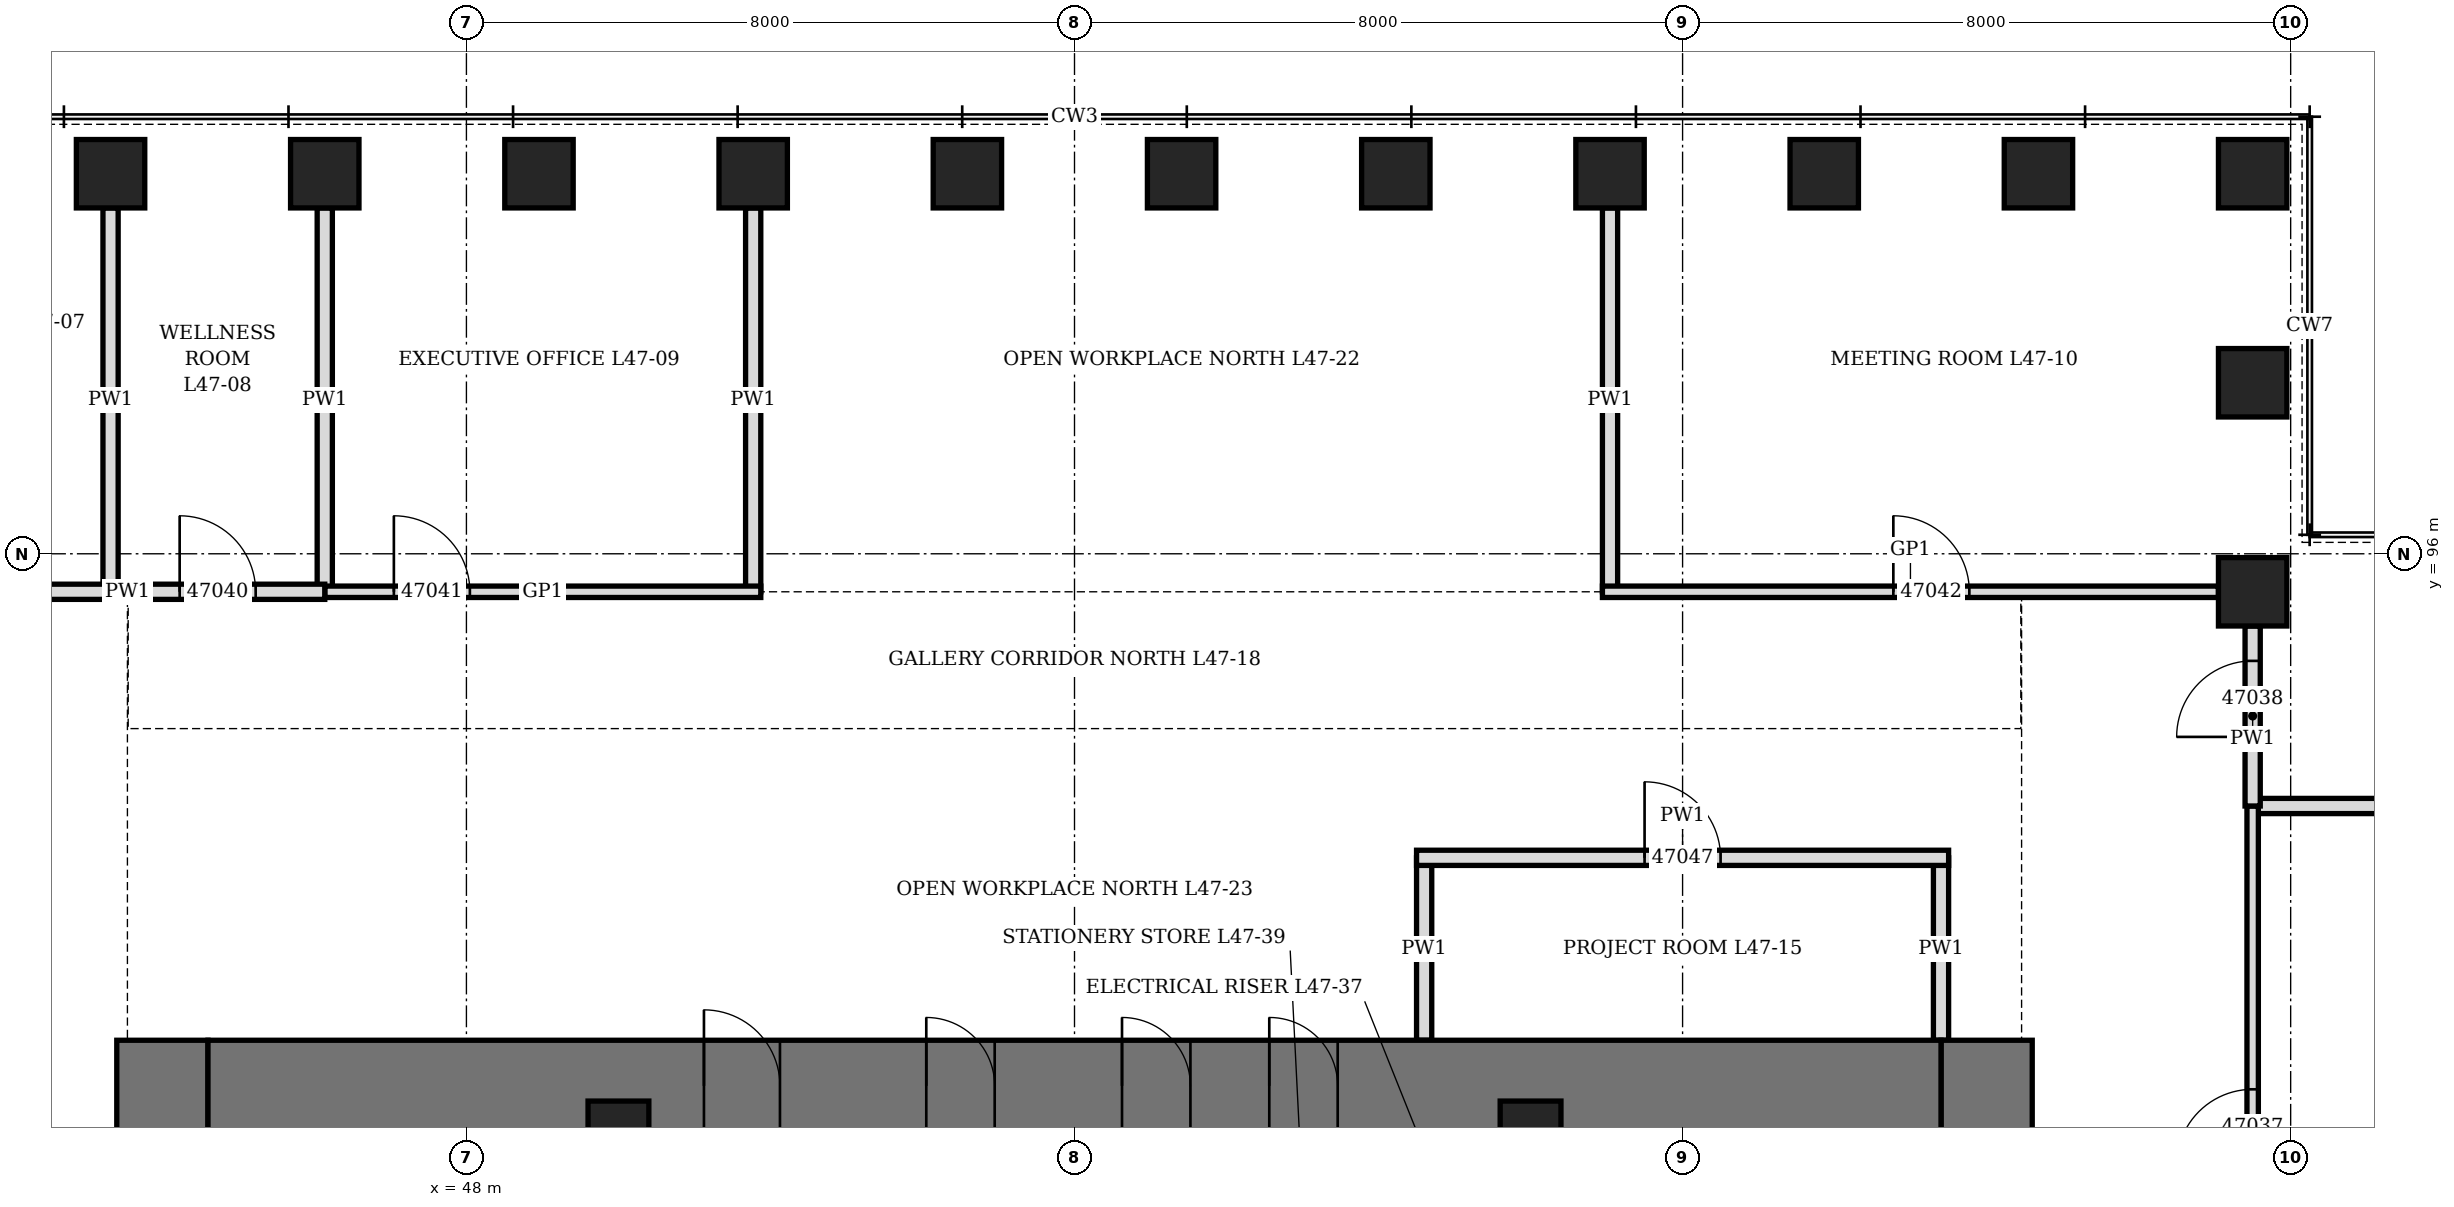
"""IFC4 building model, lengths in metres.
Left out: names, types, materials, properties, quantities, classifications, styles, units other than length and angle.
Written with IfcOpenShell. Run it as: python <this file> out.ifc"""

import sys

from ifc_helpers import new_model, si_unit, direction, frame, frame_2d, origin, origin_2d, place, context, subcontext, project, spatial, rectangle, hollow_rectangle, extrude, element, fill, save


model = new_model("IFC4")
c1 = context("Model", 3, precision=1e-05, world=origin(), true_north=direction((0.0, 1.0)))
c2 = subcontext(c1, "Body", "Model", "MODEL_VIEW")
j1 = project(units=[si_unit("LENGTHUNIT", "METRE"), si_unit("PLANEANGLEUNIT", "RADIAN")], contexts=[c1])
p1 = place(None, origin())
s1 = spatial("IfcSite", under=j1, at=p1, CompositionType="ELEMENT")
p2 = place(p1, origin())
s2 = spatial("IfcBuilding", under=s1, at=p2, CompositionType="ELEMENT")
p3 = place(p2, frame((0.0, 0.0, 210.7)))
s3 = spatial("IfcBuildingStorey", under=s2, at=p3, CompositionType="ELEMENT", Elevation=210.7)
for number, where, z_axis, x_axis in (
    (1, (71.5, 95.5, 0.0), (0.0, 0.0, 1.0), (0.0, 1.0, 0.0)),
    (2, (71.5, 98.25, 0.0), (0.0, 0.0, 1.0), (0.0, 1.0, 0.0)),
    (3, (71.5, 101.0, 0.0), (0.0, 0.0, 1.0), (1.0, 0.0, 0.0)),
    (4, (68.682, 101.0, 0.0), (0.0, 0.0, 1.0), (1.0, 0.0, 0.0)),
    (5, (65.864, 101.0, 0.0), (0.0, 0.0, 1.0), (1.0, 0.0, 0.0)),
    (6, (63.045, 101.0, 0.0), (0.0, 0.0, 1.0), (1.0, 0.0, 0.0)),
    (7, (60.227, 101.0, 0.0), (0.0, 0.0, 1.0), (1.0, 0.0, 0.0)),
    (8, (57.409, 101.0, 0.0), (0.0, 0.0, 1.0), (1.0, 0.0, 0.0)),
    (9, (54.591, 101.0, 0.0), (0.0, 0.0, 1.0), (1.0, 0.0, 0.0)),
    (10, (51.773, 101.0, 0.0), (0.0, 0.0, 1.0), (1.0, 0.0, 0.0)),
    (11, (48.955, 101.0, 0.0), (0.0, 0.0, 1.0), (1.0, 0.0, 0.0)),
    (12, (46.136, 101.0, 0.0), (0.0, 0.0, 1.0), (1.0, 0.0, 0.0)),
    (13, (43.318, 101.0, 0.0), (0.0, 0.0, 1.0), (1.0, 0.0, 0.0)),
):
    element("IfcColumn", number, at=place(p3, frame(where, z_axis=z_axis, x_axis=x_axis)), inside=s3, PredefinedType="COLUMN", context=c2, shape_type="SweptSolid", body=[
        extrude(hollow_rectangle(XDim=0.9, YDim=0.9, WallThickness=0.12, at=origin_2d()), origin(), (0.0, 0.0, 1.0), 4.2),
    ])
p4 = place(p3, frame((44.0, 70.4, 0.0), z_axis=(0.0, 0.0, 1.0), x_axis=(0.0, 1.0, 0.0)))
e14 = element("IfcWall", 14, at=p4, inside=s3, PredefinedType="SHEAR", context=c2, shape_type="SweptSolid", body=[
    extrude(rectangle(XDim=19.2, YDim=1.2, at=frame_2d((9.6, 0.0))), origin(), (0.0, 0.0, 1.0), 4.2),
])
p5 = place(p4, frame((8.6, 0.0, 0.0)))
e15 = element("IfcOpeningElement", 15, at=p5, cuts=e14, PredefinedType="OPENING", context=c2, shape_type="SweptSolid", body=[
    extrude(rectangle(XDim=2.0, YDim=2.4, at=frame_2d((1.0, 1.2))), frame((0.0, 0.61, 0.0), z_axis=(0.0, -1.0, 0.0), x_axis=(1.0, 0.0, 0.0)), (0.0, 0.0, 1.0), 1.22),
])
p6 = place(p3, frame((68.0, 70.4, 0.0), z_axis=(0.0, 0.0, 1.0), x_axis=(0.0, 1.0, 0.0)))
e16 = element("IfcWall", 16, at=p6, inside=s3, PredefinedType="SHEAR", context=c2, shape_type="SweptSolid", body=[
    extrude(rectangle(XDim=19.2, YDim=1.2, at=frame_2d((9.6, 0.0))), origin(), (0.0, 0.0, 1.0), 4.2),
])
p7 = place(p6, frame((8.6, 0.0, 0.0)))
e17 = element("IfcOpeningElement", 17, at=p7, cuts=e16, PredefinedType="OPENING", context=c2, shape_type="SweptSolid", body=[
    extrude(rectangle(XDim=2.0, YDim=2.4, at=frame_2d((1.0, 1.2))), frame((0.0, 0.61, 0.0), z_axis=(0.0, -1.0, 0.0), x_axis=(1.0, 0.0, 0.0)), (0.0, 0.0, 1.0), 1.22),
])
p8 = place(p3, frame((44.6, 89.0, 0.0), z_axis=(0.0, 0.0, 1.0), x_axis=(1.0, 0.0, 0.0)))
e18 = element("IfcWall", 18, at=p8, inside=s3, PredefinedType="SHEAR", context=c2, shape_type="SweptSolid", body=[
    extrude(rectangle(XDim=22.8, YDim=1.2, at=frame_2d((11.4, 0.0))), origin(), (0.0, 0.0, 1.0), 4.2),
])
p9 = place(p8, frame((6.525, 0.0, 0.0)))
e19 = element("IfcOpeningElement", 19, at=p9, cuts=e18, PredefinedType="OPENING", context=c2, shape_type="SweptSolid", body=[
    extrude(rectangle(XDim=1.0, YDim=2.1, at=frame_2d((0.5, 1.05))), frame((0.0, 0.61, 0.0), z_axis=(0.0, -1.0, 0.0), x_axis=(1.0, 0.0, 0.0)), (0.0, 0.0, 1.0), 1.22),
])
p10 = place(p8, frame((9.45, 0.0, 0.0)))
e20 = element("IfcOpeningElement", 20, at=p10, cuts=e18, PredefinedType="OPENING", context=c2, shape_type="SweptSolid", body=[
    extrude(rectangle(XDim=0.9, YDim=2.1, at=frame_2d((0.45, 1.05))), frame((0.0, 0.61, 0.0), z_axis=(0.0, -1.0, 0.0), x_axis=(1.0, 0.0, 0.0)), (0.0, 0.0, 1.0), 1.22),
])
p11 = place(p8, frame((12.025, 0.0, 0.0)))
e21 = element("IfcOpeningElement", 21, at=p11, cuts=e18, PredefinedType="OPENING", context=c2, shape_type="SweptSolid", body=[
    extrude(rectangle(XDim=0.9, YDim=2.1, at=frame_2d((0.45, 1.05))), frame((0.0, 0.61, 0.0), z_axis=(0.0, -1.0, 0.0), x_axis=(1.0, 0.0, 0.0)), (0.0, 0.0, 1.0), 1.22),
])
p12 = place(p8, frame((13.962, 0.0, 0.0)))
e22 = element("IfcOpeningElement", 22, at=p12, cuts=e18, PredefinedType="OPENING", context=c2, shape_type="SweptSolid", body=[
    extrude(rectangle(XDim=0.9, YDim=2.1, at=frame_2d((0.45, 1.05))), frame((0.0, 0.61, 0.0), z_axis=(0.0, -1.0, 0.0), x_axis=(1.0, 0.0, 0.0)), (0.0, 0.0, 1.0), 1.22),
])
for number, where, z_axis, x_axis in (
    (23, (50.0, 88.4, 0.0), (0.0, 0.0, 1.0), (1.0, 0.0, 0.0)),
    (24, (62.0, 88.4, 0.0), (0.0, 0.0, 1.0), (1.0, 0.0, 0.0)),
):
    element("IfcColumn", number, at=place(p3, frame(where, z_axis=z_axis, x_axis=x_axis)), inside=s3, PredefinedType="COLUMN", context=c2, shape_type="SweptSolid", body=[
        extrude(hollow_rectangle(XDim=0.8, YDim=0.8, WallThickness=0.1, at=origin_2d()), origin(), (0.0, 0.0, 1.0), 4.2),
    ])
for number, where, z_axis, x_axis in (
    (25, (71.5, 92.682, 0.0), (0.0, 0.0, 1.0), (1.0, 0.0, 0.0)),
    (26, (43.318, 95.5, 0.0), (0.0, 0.0, 1.0), (0.0, 1.0, 0.0)),
    (27, (46.136, 95.5, 0.0), (0.0, 0.0, 1.0), (0.0, 1.0, 0.0)),
    (28, (51.773, 95.5, 0.0), (0.0, 0.0, 1.0), (0.0, 1.0, 0.0)),
    (29, (63.045, 95.5, 0.0), (0.0, 0.0, 1.0), (0.0, 1.0, 0.0)),
):
    element("IfcWall", number, at=place(p3, frame(where, z_axis=z_axis, x_axis=x_axis)), inside=s3, PredefinedType="PARTITIONING", context=c2, shape_type="SweptSolid", body=[
        extrude(rectangle(XDim=5.05, YDim=0.2, at=frame_2d((2.525, 0.0))), origin(), (0.0, 0.0, 1.0), 3.428),
    ])
for number, where, z_axis, x_axis in (
    (30, (60.6, 89.6, 0.0), (0.0, 0.0, 1.0), (0.0, 1.0, 0.0)),
    (31, (67.4, 89.6, 0.0), (0.0, 0.0, 1.0), (0.0, 1.0, 0.0)),
):
    element("IfcWall", number, at=place(p3, frame(where, z_axis=z_axis, x_axis=x_axis)), inside=s3, PredefinedType="PARTITIONING", context=c2, shape_type="SweptSolid", body=[
        extrude(rectangle(XDim=2.4, YDim=0.2, at=frame_2d((1.2, 0.0))), origin(), (0.0, 0.0, 1.0), 4.04),
    ])
p13 = place(p3, frame((60.5, 92.0, 0.0), z_axis=(0.0, 0.0, 1.0), x_axis=(1.0, 0.0, 0.0)))
e32 = element("IfcWall", 32, at=p13, inside=s3, PredefinedType="PARTITIONING", context=c2, shape_type="SweptSolid", body=[
    extrude(rectangle(XDim=7.0, YDim=0.2, at=frame_2d((3.5, 0.0))), origin(), (0.0, 0.0, 1.0), 4.04),
])
p14 = place(p13, frame((3.0, 0.0, 0.0)))
e33 = element("IfcOpeningElement", 33, at=p14, cuts=e32, PredefinedType="OPENING", context=c2, shape_type="SweptSolid", body=[
    extrude(rectangle(XDim=1.0, YDim=2.1, at=frame_2d((0.5, 1.05))), frame((0.0, 0.11, 0.0), z_axis=(0.0, -1.0, 0.0), x_axis=(1.0, 0.0, 0.0)), (0.0, 0.0, 1.0), 0.22),
])
p15 = place(p3, frame((46.136, 95.5, 0.0), z_axis=(0.0, 0.0, 1.0), x_axis=(1.0, 0.0, 0.0)))
e34 = element("IfcWall", 34, at=p15, inside=s3, PredefinedType="PARTITIONING", context=c2, shape_type="SweptSolid", body=[
    extrude(rectangle(XDim=5.736, YDim=0.15, at=frame_2d((2.868, 0.0))), origin(), (0.0, 0.0, 1.0), 4.04),
])
p16 = place(p15, frame((0.909, 0.0, 0.0)))
e35 = element("IfcOpeningElement", 35, at=p16, cuts=e34, PredefinedType="OPENING", context=c2, shape_type="SweptSolid", body=[
    extrude(rectangle(XDim=1.0, YDim=2.1, at=frame_2d((0.5, 1.05))), frame((0.0, 0.085, 0.0), z_axis=(0.0, -1.0, 0.0), x_axis=(1.0, 0.0, 0.0)), (0.0, 0.0, 1.0), 0.17),
])
p17 = place(p3, frame((62.946, 95.5, 0.0), z_axis=(0.0, 0.0, 1.0), x_axis=(1.0, 0.0, 0.0)))
e36 = element("IfcWall", 36, at=p17, inside=s3, PredefinedType="PARTITIONING", context=c2, shape_type="SweptSolid", body=[
    extrude(rectangle(XDim=8.104, YDim=0.15, at=frame_2d((4.052, 0.0))), origin(), (0.0, 0.0, 1.0), 4.04),
])
p18 = place(p17, frame((3.827, 0.0, 0.0)))
e37 = element("IfcOpeningElement", 37, at=p18, cuts=e36, PredefinedType="OPENING", context=c2, shape_type="SweptSolid", body=[
    extrude(rectangle(XDim=1.0, YDim=2.4, at=frame_2d((0.5, 1.2))), frame((0.0, 0.085, 0.0), z_axis=(0.0, -1.0, 0.0), x_axis=(1.0, 0.0, 0.0)), (0.0, 0.0, 1.0), 0.17),
])
p19 = place(p3, frame((40.95, 95.5, 0.0), z_axis=(0.0, 0.0, 1.0), x_axis=(1.0, 0.0, 0.0)))
e38 = element("IfcWall", 38, at=p19, inside=s3, PredefinedType="PARTITIONING", context=c2, shape_type="SweptSolid", body=[
    extrude(rectangle(XDim=5.187, YDim=0.2, at=frame_2d((2.593, 0.0))), origin(), (0.0, 0.0, 1.0), 4.04),
])
p20 = place(p19, frame((0.459, 0.0, 0.0)))
e39 = element("IfcOpeningElement", 39, at=p20, cuts=e38, PredefinedType="OPENING", context=c2, shape_type="SweptSolid", body=[
    extrude(rectangle(XDim=1.0, YDim=2.1, at=frame_2d((0.5, 1.05))), frame((0.0, 0.11, 0.0), z_axis=(0.0, -1.0, 0.0), x_axis=(1.0, 0.0, 0.0)), (0.0, 0.0, 1.0), 0.22),
])
p21 = place(p19, frame((3.277, 0.0, 0.0)))
e40 = element("IfcOpeningElement", 40, at=p21, cuts=e38, PredefinedType="OPENING", context=c2, shape_type="SweptSolid", body=[
    extrude(rectangle(XDim=1.0, YDim=2.1, at=frame_2d((0.5, 1.05))), frame((0.0, 0.11, 0.0), z_axis=(0.0, -1.0, 0.0), x_axis=(1.0, 0.0, 0.0)), (0.0, 0.0, 1.0), 0.22),
])
p22 = place(p3, frame((71.5, 81.309, 0.0), z_axis=(0.0, 0.0, 1.0), x_axis=(0.0, 1.0, 0.0)))
e41 = element("IfcWall", 41, at=p22, inside=s3, PredefinedType="PARTITIONING", context=c2, shape_type="SweptSolid", body=[
    extrude(rectangle(XDim=11.373, YDim=0.15, at=frame_2d((5.687, 0.0))), origin(), (0.0, 0.0, 1.0), 4.04),
])
p23 = place(p22, frame((1.009, 0.0, 0.0)))
e42 = element("IfcOpeningElement", 42, at=p23, cuts=e41, PredefinedType="OPENING", context=c2, shape_type="SweptSolid", body=[
    extrude(rectangle(XDim=1.0, YDim=2.1, at=frame_2d((0.5, 1.05))), frame((0.0, 0.085, 0.0), z_axis=(0.0, -1.0, 0.0), x_axis=(1.0, 0.0, 0.0)), (0.0, 0.0, 1.0), 0.17),
])
p24 = place(p22, frame((6.646, 0.0, 0.0)))
e43 = element("IfcOpeningElement", 43, at=p24, cuts=e41, PredefinedType="OPENING", context=c2, shape_type="SweptSolid", body=[
    extrude(rectangle(XDim=1.0, YDim=2.1, at=frame_2d((0.5, 1.05))), frame((0.0, 0.085, 0.0), z_axis=(0.0, -1.0, 0.0), x_axis=(1.0, 0.0, 0.0)), (0.0, 0.0, 1.0), 0.17),
])
p25 = place(p3, frame((71.5, 92.682, 0.0), z_axis=(0.0, 0.0, 1.0), x_axis=(0.0, 1.0, 0.0)))
e44 = element("IfcWall", 44, at=p25, inside=s3, PredefinedType="PARTITIONING", context=c2, shape_type="SweptSolid", body=[
    extrude(rectangle(XDim=2.368, YDim=0.2, at=frame_2d((1.184, 0.0))), origin(), (0.0, 0.0, 1.0), 4.04),
])
p26 = place(p25, frame((0.909, 0.0, 0.0)))
e45 = element("IfcOpeningElement", 45, at=p26, cuts=e44, PredefinedType="OPENING", context=c2, shape_type="SweptSolid", body=[
    extrude(rectangle(XDim=1.0, YDim=2.1, at=frame_2d((0.5, 1.05))), frame((0.0, 0.11, 0.0), z_axis=(0.0, -1.0, 0.0), x_axis=(1.0, 0.0, 0.0)), (0.0, 0.0, 1.0), 0.22),
])
p27 = place(p9, origin())
e46 = element("IfcDoor", 46, at=p27, inside=s3, OperationType="SINGLE_SWING_LEFT", PredefinedType="DOOR", context=c2, shape_type="SweptSolid", body=[
    extrude(rectangle(XDim=1.0, YDim=2.1, at=frame_2d((0.5, 1.05))), frame((0.0, 0.35, 0.0), z_axis=(0.0, -1.0, 0.0), x_axis=(1.0, 0.0, 0.0)), (0.0, 0.0, 1.0), 0.7),
])
fill(e19, e46)
p28 = place(p10, origin())
e47 = element("IfcDoor", 47, at=p28, inside=s3, OperationType="SINGLE_SWING_LEFT", PredefinedType="DOOR", context=c2, shape_type="SweptSolid", body=[
    extrude(rectangle(XDim=0.9, YDim=2.1, at=frame_2d((0.45, 1.05))), frame((0.0, 0.35, 0.0), z_axis=(0.0, -1.0, 0.0), x_axis=(1.0, 0.0, 0.0)), (0.0, 0.0, 1.0), 0.7),
])
fill(e20, e47)
p29 = place(p11, origin())
e48 = element("IfcDoor", 48, at=p29, inside=s3, OperationType="SINGLE_SWING_LEFT", PredefinedType="DOOR", context=c2, shape_type="SweptSolid", body=[
    extrude(rectangle(XDim=0.9, YDim=2.1, at=frame_2d((0.45, 1.05))), frame((0.0, 0.35, 0.0), z_axis=(0.0, -1.0, 0.0), x_axis=(1.0, 0.0, 0.0)), (0.0, 0.0, 1.0), 0.7),
])
fill(e21, e48)
p30 = place(p12, origin())
e49 = element("IfcDoor", 49, at=p30, inside=s3, OperationType="SINGLE_SWING_LEFT", PredefinedType="DOOR", context=c2, shape_type="SweptSolid", body=[
    extrude(rectangle(XDim=0.9, YDim=2.1, at=frame_2d((0.45, 1.05))), frame((0.0, 0.35, 0.0), z_axis=(0.0, -1.0, 0.0), x_axis=(1.0, 0.0, 0.0)), (0.0, 0.0, 1.0), 0.7),
])
fill(e22, e49)
p31 = place(p24, origin())
e50 = element("IfcDoor", 50, at=p31, inside=s3, OperationType="SINGLE_SWING_LEFT", PredefinedType="DOOR", context=c2, shape_type="SweptSolid", body=[
    extrude(rectangle(XDim=1.0, YDim=2.1, at=frame_2d((0.5, 1.05))), frame((0.0, 0.075, 0.0), z_axis=(0.0, -1.0, 0.0), x_axis=(1.0, 0.0, 0.0)), (0.0, 0.0, 1.0), 0.149),
])
fill(e43, e50)
p32 = place(p26, origin())
e51 = element("IfcDoor", 51, at=p32, inside=s3, OperationType="SINGLE_SWING_LEFT", PredefinedType="DOOR", context=c2, shape_type="SweptSolid", body=[
    extrude(rectangle(XDim=1.0, YDim=2.1, at=frame_2d((0.5, 1.05))), frame((0.0, 0.1, 0.0), z_axis=(0.0, -1.0, 0.0), x_axis=(1.0, 0.0, 0.0)), (0.0, 0.0, 1.0), 0.199),
])
fill(e45, e51)
p33 = place(p21, origin())
e52 = element("IfcDoor", 52, at=p33, inside=s3, OperationType="SINGLE_SWING_LEFT", PredefinedType="DOOR", context=c2, shape_type="SweptSolid", body=[
    extrude(rectangle(XDim=1.0, YDim=2.1, at=frame_2d((0.5, 1.05))), frame((0.0, 0.1, 0.0), z_axis=(0.0, -1.0, 0.0), x_axis=(1.0, 0.0, 0.0)), (0.0, 0.0, 1.0), 0.199),
])
fill(e40, e52)
p34 = place(p16, origin())
e53 = element("IfcDoor", 53, at=p34, inside=s3, OperationType="SINGLE_SWING_LEFT", PredefinedType="DOOR", context=c2, shape_type="SweptSolid", body=[
    extrude(rectangle(XDim=1.0, YDim=2.1, at=frame_2d((0.5, 1.05))), frame((0.0, 0.075, 0.0), z_axis=(0.0, -1.0, 0.0), x_axis=(1.0, 0.0, 0.0)), (0.0, 0.0, 1.0), 0.149),
])
fill(e35, e53)
p35 = place(p18, origin())
e54 = element("IfcDoor", 54, at=p35, inside=s3, OperationType="SINGLE_SWING_RIGHT", PredefinedType="DOOR", context=c2, shape_type="SweptSolid", body=[
    extrude(rectangle(XDim=1.0, YDim=2.4, at=frame_2d((0.5, 1.2))), frame((0.0, 0.075, 0.0), z_axis=(0.0, -1.0, 0.0), x_axis=(1.0, 0.0, 0.0)), (0.0, 0.0, 1.0), 0.149),
])
fill(e37, e54)
p36 = place(p14, origin())
e55 = element("IfcDoor", 55, at=p36, inside=s3, OperationType="SINGLE_SWING_LEFT", PredefinedType="DOOR", context=c2, shape_type="SweptSolid", body=[
    extrude(rectangle(XDim=1.0, YDim=2.1, at=frame_2d((0.5, 1.05))), frame((0.0, 0.1, 0.0), z_axis=(0.0, -1.0, 0.0), x_axis=(1.0, 0.0, 0.0)), (0.0, 0.0, 1.0), 0.199),
])
fill(e33, e55)
save(model, sys.argv[1])
